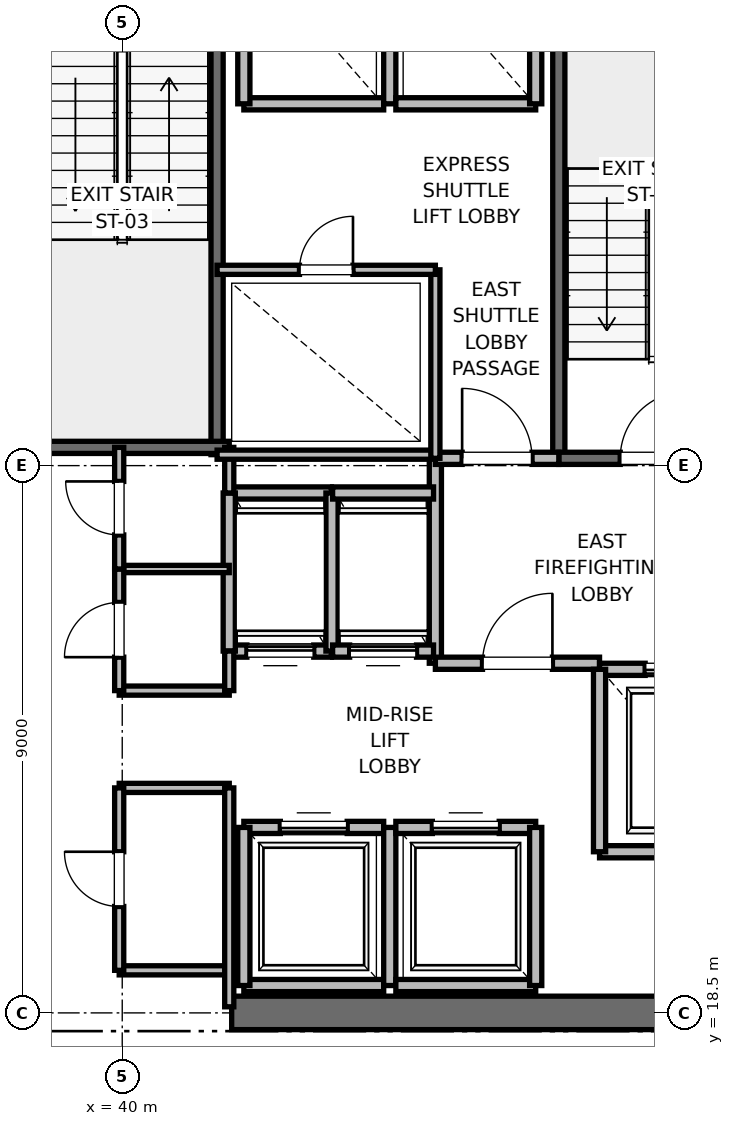
"""IFC4 building model, lengths in metres.
Left out: names, types, materials, properties, quantities, classifications, styles, units other than length and angle.
Written with IfcOpenShell. Run it as: python <this file> out.ifc"""

import sys

from ifc_helpers import new_model, si_unit, direction, frame, frame_2d, origin, place, context, subcontext, project, spatial, rectangle, extrude, element, fill, save


model = new_model("IFC4")
c1 = context("Model", 3, precision=1e-05, world=origin(), true_north=direction((0.0, 1.0)))
c2 = subcontext(c1, "Body", "Model", "MODEL_VIEW")
j1 = project(units=[si_unit("LENGTHUNIT", "METRE"), si_unit("PLANEANGLEUNIT", "RADIAN")], contexts=[c1])
p1 = place(None, origin())
s1 = spatial("IfcSite", under=j1, at=p1, CompositionType="ELEMENT")
p2 = place(p1, origin())
s2 = spatial("IfcBuilding", under=s1, at=p2, CompositionType="ELEMENT")
p3 = place(p2, frame((0.0, 0.0, 213.2)))
s3 = spatial("IfcBuildingStorey", under=s2, at=p3, CompositionType="ELEMENT", Elevation=213.2)
p4 = place(p3, frame((41.8, 18.5, 0.0), z_axis=(0.0, 0.0, 1.0), x_axis=(1.0, 0.0, 0.0)))
e1 = element("IfcWall", 1, at=p4, inside=s3, PredefinedType="SHEAR", context=c2, shape_type="SweptSolid", body=[
    extrude(rectangle(XDim=9.2, YDim=0.55, at=frame_2d((4.6, 0.0))), origin(), (0.0, 0.0, 1.0), 3.775),
])
p5 = place(p3, frame((47.18, 27.62, 0.0), z_axis=(0.0, 0.0, 1.0), x_axis=(0.0, 1.0, 0.0)))
e2 = element("IfcWall", 2, at=p5, inside=s3, PredefinedType="SOLIDWALL", context=c2, shape_type="SweptSolid", body=[
    extrude(rectangle(XDim=8.18, YDim=0.2, at=frame_2d((4.09, 0.0))), origin(), (0.0, 0.0, 1.0), 3.775),
])
p6 = place(p3, frame((47.18, 27.62, 0.0), z_axis=(0.0, 0.0, 1.0), x_axis=(1.0, 0.0, 0.0)))
e3 = element("IfcWall", 3, at=p6, inside=s3, PredefinedType="SOLIDWALL", context=c2, shape_type="SweptSolid", body=[
    extrude(rectangle(XDim=3.12, YDim=0.2, at=frame_2d((1.56, 0.0))), origin(), (0.0, 0.0, 1.0), 3.775),
])
p7 = place(p6, frame((1.01, 0.0, 0.0)))
e4 = element("IfcOpeningElement", 4, at=p7, cuts=e3, PredefinedType="OPENING", context=c2, shape_type="SweptSolid", body=[
    extrude(rectangle(XDim=1.1, YDim=2.15, at=frame_2d((0.55, 1.075))), frame((0.0, 0.1, 0.0), z_axis=(0.0, -1.0, 0.0), x_axis=(1.0, 0.0, 0.0)), (0.0, 0.0, 1.0), 0.2),
])
p8 = place(p3, frame((41.56, 27.68, 0.0), z_axis=(0.0, 0.0, 1.0), x_axis=(0.0, 1.0, 0.0)))
e5 = element("IfcWall", 5, at=p8, inside=s3, PredefinedType="SOLIDWALL", context=c2, shape_type="SweptSolid", body=[
    extrude(rectangle(XDim=8.57, YDim=0.2, at=frame_2d((4.285, 0.0))), origin(), (0.0, 0.0, 1.0), 3.775),
])
p9 = place(p3, frame((38.44, 27.8, 0.0), z_axis=(0.0, 0.0, 1.0), x_axis=(1.0, 0.0, 0.0)))
e6 = element("IfcWall", 6, at=p9, inside=s3, PredefinedType="SOLIDWALL", context=c2, shape_type="SweptSolid", body=[
    extrude(rectangle(XDim=3.32, YDim=0.2, at=frame_2d((1.66, 0.0))), origin(), (0.0, 0.0, 1.0), 3.775),
])
p10 = place(p3, frame((45.15, 24.25, 0.0), z_axis=(0.0, 0.0, 1.0), x_axis=(0.0, 1.0, 0.0)))
e7 = element("IfcWall", 7, at=p10, inside=s3, PredefinedType="PARTITIONING", context=c2, shape_type="SweptSolid", body=[
    extrude(rectangle(XDim=3.37, YDim=0.2, at=frame_2d((1.685, 0.0))), origin(), (0.0, 0.0, 1.0), 3.775),
])
p11 = place(p3, frame((45.15, 24.25, 0.0), z_axis=(0.0, 0.0, 1.0), x_axis=(1.0, 0.0, 0.0)))
e8 = element("IfcWall", 8, at=p11, inside=s3, PredefinedType="PARTITIONING", context=c2, shape_type="SweptSolid", body=[
    extrude(rectangle(XDim=2.7, YDim=0.2, at=frame_2d((1.35, 0.0))), origin(), (0.0, 0.0, 1.0), 3.775),
])
p12 = place(p11, frame((0.775, 0.0, 0.0)))
e9 = element("IfcOpeningElement", 9, at=p12, cuts=e8, PredefinedType="OPENING", context=c2, shape_type="SweptSolid", body=[
    extrude(rectangle(XDim=1.15, YDim=2.2, at=frame_2d((0.575, 1.1))), frame((0.0, 0.1, 0.0), z_axis=(0.0, -1.0, 0.0), x_axis=(1.0, 0.0, 0.0)), (0.0, 0.0, 1.0), 0.2),
])
p13 = place(p3, frame((45.15, 27.62, 0.0), z_axis=(0.0, 0.0, 1.0), x_axis=(1.0, 0.0, 0.0)))
e10 = element("IfcWall", 10, at=p13, inside=s3, PredefinedType="PARTITIONING", context=c2, shape_type="SweptSolid", body=[
    extrude(rectangle(XDim=2.03, YDim=0.2, at=frame_2d((1.015, 0.0))), origin(), (0.0, 0.0, 1.0), 3.775),
])
p14 = place(p13, frame((0.44, 0.0, 0.0)))
e11 = element("IfcOpeningElement", 11, at=p14, cuts=e10, PredefinedType="OPENING", context=c2, shape_type="SweptSolid", body=[
    extrude(rectangle(XDim=1.15, YDim=2.2, at=frame_2d((0.575, 1.1))), frame((0.0, 0.1, 0.0), z_axis=(0.0, -1.0, 0.0), x_axis=(1.0, 0.0, 0.0)), (0.0, 0.0, 1.0), 0.2),
])
p15 = place(p3, frame((47.85, 21.15, 0.0), z_axis=(0.0, 0.0, 1.0), x_axis=(1.0, 0.0, 0.0)))
e12 = element("IfcWall", 12, at=p15, inside=s3, PredefinedType="SOLIDWALL", context=c2, shape_type="SweptSolid", body=[
    extrude(rectangle(XDim=2.6, YDim=0.2, at=frame_2d((1.3, 0.0))), origin(), (0.0, 0.0, 1.0), 3.775),
])
p16 = place(p3, frame((50.45, 24.15, 0.0), z_axis=(0.0, 0.0, 1.0), x_axis=(-1.0, 0.0, 0.0)))
e13 = element("IfcWall", 13, at=p16, inside=s3, PredefinedType="SOLIDWALL", context=c2, shape_type="SweptSolid", body=[
    extrude(rectangle(XDim=2.6, YDim=0.2, at=frame_2d((1.3, 0.0))), origin(), (0.0, 0.0, 1.0), 2.755),
])
p17 = place(p16, frame((0.75, 0.0, 0.0)))
e14 = element("IfcOpeningElement", 14, at=p17, cuts=e13, PredefinedType="OPENING", context=c2, shape_type="SweptSolid", body=[
    extrude(rectangle(XDim=1.1, YDim=2.2, at=frame_2d((0.55, 1.1))), frame((0.0, 0.1, 0.0), z_axis=(0.0, -1.0, 0.0), x_axis=(1.0, 0.0, 0.0)), (0.0, 0.0, 1.0), 0.2),
])
p18 = place(p3, frame((47.85, 24.15, 0.0), z_axis=(0.0, 0.0, 1.0), x_axis=(0.0, -1.0, 0.0)))
e15 = element("IfcWall", 15, at=p18, inside=s3, PredefinedType="SOLIDWALL", context=c2, shape_type="SweptSolid", body=[
    extrude(rectangle(XDim=3.0, YDim=0.2, at=frame_2d((1.5, 0.0))), origin(), (0.0, 0.0, 1.0), 3.775),
])
p19 = place(p3, frame((42.0, 18.95, 0.0), z_axis=(0.0, 0.0, 1.0), x_axis=(1.0, 0.0, 0.0)))
e16 = element("IfcWall", 16, at=p19, inside=s3, PredefinedType="SOLIDWALL", context=c2, shape_type="SweptSolid", body=[
    extrude(rectangle(XDim=2.3, YDim=0.2, at=frame_2d((1.15, 0.0))), origin(), (0.0, 0.0, 1.0), 2.755),
])
p20 = place(p3, frame((44.3, 21.55, 0.0), z_axis=(0.0, 0.0, 1.0), x_axis=(-1.0, 0.0, 0.0)))
e17 = element("IfcWall", 17, at=p20, inside=s3, PredefinedType="SOLIDWALL", context=c2, shape_type="SweptSolid", body=[
    extrude(rectangle(XDim=2.3, YDim=0.2, at=frame_2d((1.15, 0.0))), origin(), (0.0, 0.0, 1.0), 3.775),
])
p21 = place(p20, frame((0.6, 0.0, 0.0)))
e18 = element("IfcOpeningElement", 18, at=p21, cuts=e17, PredefinedType="OPENING", context=c2, shape_type="SweptSolid", body=[
    extrude(rectangle(XDim=1.1, YDim=2.2, at=frame_2d((0.55, 1.1))), frame((0.0, 0.1, 0.0), z_axis=(0.0, -1.0, 0.0), x_axis=(1.0, 0.0, 0.0)), (0.0, 0.0, 1.0), 0.2),
])
p22 = place(p3, frame((42.0, 21.55, 0.0), z_axis=(0.0, 0.0, 1.0), x_axis=(0.0, -1.0, 0.0)))
e19 = element("IfcWall", 19, at=p22, inside=s3, PredefinedType="SOLIDWALL", context=c2, shape_type="SweptSolid", body=[
    extrude(rectangle(XDim=2.6, YDim=0.2, at=frame_2d((1.3, 0.0))), origin(), (0.0, 0.0, 1.0), 2.755),
])
p23 = place(p3, frame((44.4, 18.95, 0.0), z_axis=(0.0, 0.0, 1.0), x_axis=(0.0, 1.0, 0.0)))
e20 = element("IfcWall", 20, at=p23, inside=s3, PredefinedType="SOLIDWALL", context=c2, shape_type="SweptSolid", body=[
    extrude(rectangle(XDim=2.6, YDim=0.2, at=frame_2d((1.3, 0.0))), origin(), (0.0, 0.0, 1.0), 3.775),
])
p24 = place(p3, frame((44.5, 18.95, 0.0), z_axis=(0.0, 0.0, 1.0), x_axis=(1.0, 0.0, 0.0)))
e21 = element("IfcWall", 21, at=p24, inside=s3, PredefinedType="SOLIDWALL", context=c2, shape_type="SweptSolid", body=[
    extrude(rectangle(XDim=2.3, YDim=0.2, at=frame_2d((1.15, 0.0))), origin(), (0.0, 0.0, 1.0), 3.775),
])
p25 = place(p3, frame((46.8, 21.55, 0.0), z_axis=(0.0, 0.0, 1.0), x_axis=(-1.0, 0.0, 0.0)))
e22 = element("IfcWall", 22, at=p25, inside=s3, PredefinedType="SOLIDWALL", context=c2, shape_type="SweptSolid", body=[
    extrude(rectangle(XDim=2.3, YDim=0.2, at=frame_2d((1.15, 0.0))), origin(), (0.0, 0.0, 1.0), 3.775),
])
p26 = place(p25, frame((0.6, 0.0, 0.0)))
e23 = element("IfcOpeningElement", 23, at=p26, cuts=e22, PredefinedType="OPENING", context=c2, shape_type="SweptSolid", body=[
    extrude(rectangle(XDim=1.1, YDim=2.2, at=frame_2d((0.55, 1.1))), frame((0.0, 0.1, 0.0), z_axis=(0.0, -1.0, 0.0), x_axis=(1.0, 0.0, 0.0)), (0.0, 0.0, 1.0), 0.2),
])
p27 = place(p3, frame((46.8, 18.95, 0.0), z_axis=(0.0, 0.0, 1.0), x_axis=(0.0, 1.0, 0.0)))
e24 = element("IfcWall", 24, at=p27, inside=s3, PredefinedType="SOLIDWALL", context=c2, shape_type="SweptSolid", body=[
    extrude(rectangle(XDim=2.6, YDim=0.2, at=frame_2d((1.3, 0.0))), origin(), (0.0, 0.0, 1.0), 3.775),
])
p28 = place(p3, frame((41.76, 24.45, 0.0), z_axis=(0.0, 0.0, 1.0), x_axis=(1.0, 0.0, 0.0)))
e25 = element("IfcWall", 25, at=p28, inside=s3, PredefinedType="SOLIDWALL", context=c2, shape_type="SweptSolid", body=[
    extrude(rectangle(XDim=1.68, YDim=0.2, at=frame_2d((0.84, 0.0))), origin(), (0.0, 0.0, 1.0), 3.775),
])
p29 = place(p28, frame((0.29, 0.0, 0.0)))
e26 = element("IfcOpeningElement", 26, at=p29, cuts=e25, PredefinedType="OPENING", context=c2, shape_type="SweptSolid", body=[
    extrude(rectangle(XDim=1.1, YDim=2.2, at=frame_2d((0.55, 1.1))), frame((0.0, 0.1, 0.0), z_axis=(0.0, -1.0, 0.0), x_axis=(1.0, 0.0, 0.0)), (0.0, 0.0, 1.0), 0.2),
])
p30 = place(p3, frame((43.44, 27.05, 0.0), z_axis=(0.0, 0.0, 1.0), x_axis=(-1.0, 0.0, 0.0)))
e27 = element("IfcWall", 27, at=p30, inside=s3, PredefinedType="SOLIDWALL", context=c2, shape_type="SweptSolid", body=[
    extrude(rectangle(XDim=1.68, YDim=0.2, at=frame_2d((0.84, 0.0))), origin(), (0.0, 0.0, 1.0), 3.775),
])
for number, where, z_axis, x_axis in (
    (28, (41.76, 27.05, 0.0), (0.0, 0.0, 1.0), (0.0, -1.0, 0.0)),
    (29, (43.45, 24.45, 0.0), (0.0, 0.0, 1.0), (0.0, 1.0, 0.0)),
):
    element("IfcWall", number, at=place(p3, frame(where, z_axis=z_axis, x_axis=x_axis)), inside=s3, PredefinedType="SOLIDWALL", context=c2, shape_type="SweptSolid", body=[
        extrude(rectangle(XDim=2.6, YDim=0.2, at=frame_2d((1.3, 0.0))), origin(), (0.0, 0.0, 1.0), 3.775),
    ])
p31 = place(p3, frame((43.46, 24.45, 0.0), z_axis=(0.0, 0.0, 1.0), x_axis=(1.0, 0.0, 0.0)))
e30 = element("IfcWall", 30, at=p31, inside=s3, PredefinedType="SOLIDWALL", context=c2, shape_type="SweptSolid", body=[
    extrude(rectangle(XDim=1.66, YDim=0.2, at=frame_2d((0.83, 0.0))), origin(), (0.0, 0.0, 1.0), 3.775),
])
p32 = place(p31, frame((0.28, 0.0, 0.0)))
e31 = element("IfcOpeningElement", 31, at=p32, cuts=e30, PredefinedType="OPENING", context=c2, shape_type="SweptSolid", body=[
    extrude(rectangle(XDim=1.1, YDim=2.2, at=frame_2d((0.55, 1.1))), frame((0.0, 0.1, 0.0), z_axis=(0.0, -1.0, 0.0), x_axis=(1.0, 0.0, 0.0)), (0.0, 0.0, 1.0), 0.2),
])
p33 = place(p3, frame((45.12, 27.05, 0.0), z_axis=(0.0, 0.0, 1.0), x_axis=(-1.0, 0.0, 0.0)))
e32 = element("IfcWall", 32, at=p33, inside=s3, PredefinedType="SOLIDWALL", context=c2, shape_type="SweptSolid", body=[
    extrude(rectangle(XDim=1.66, YDim=0.2, at=frame_2d((0.83, 0.0))), origin(), (0.0, 0.0, 1.0), 3.775),
])
p34 = place(p3, frame((42.0, 33.45, 0.0), z_axis=(0.0, 0.0, 1.0), x_axis=(1.0, 0.0, 0.0)))
e33 = element("IfcWall", 33, at=p34, inside=s3, PredefinedType="SOLIDWALL", context=c2, shape_type="SweptSolid", body=[
    extrude(rectangle(XDim=2.3, YDim=0.2, at=frame_2d((1.15, 0.0))), origin(), (0.0, 0.0, 1.0), 3.775),
])
for number, where, z_axis, x_axis in (
    (34, (42.0, 36.05, 0.0), (0.0, 0.0, 1.0), (0.0, -1.0, 0.0)),
    (35, (44.4, 33.45, 0.0), (0.0, 0.0, 1.0), (0.0, 1.0, 0.0)),
):
    element("IfcWall", number, at=place(p3, frame(where, z_axis=z_axis, x_axis=x_axis)), inside=s3, PredefinedType="SOLIDWALL", context=c2, shape_type="SweptSolid", body=[
        extrude(rectangle(XDim=2.6, YDim=0.2, at=frame_2d((1.3, 0.0))), origin(), (0.0, 0.0, 1.0), 2.755),
    ])
p35 = place(p3, frame((44.5, 33.45, 0.0), z_axis=(0.0, 0.0, 1.0), x_axis=(1.0, 0.0, 0.0)))
e36 = element("IfcWall", 36, at=p35, inside=s3, PredefinedType="SOLIDWALL", context=c2, shape_type="SweptSolid", body=[
    extrude(rectangle(XDim=2.3, YDim=0.2, at=frame_2d((1.15, 0.0))), origin(), (0.0, 0.0, 1.0), 3.775),
])
p36 = place(p3, frame((46.8, 33.45, 0.0), z_axis=(0.0, 0.0, 1.0), x_axis=(0.0, 1.0, 0.0)))
e37 = element("IfcWall", 37, at=p36, inside=s3, PredefinedType="SOLIDWALL", context=c2, shape_type="SweptSolid", body=[
    extrude(rectangle(XDim=2.6, YDim=0.2, at=frame_2d((1.3, 0.0))), origin(), (0.0, 0.0, 1.0), 3.775),
])
for number, where, z_axis, x_axis in (
    (38, (39.95, 19.2, 0.0), (0.0, 0.0, 1.0), (1.0, 0.0, 0.0)),
    (39, (39.95, 22.2, 0.0), (0.0, 0.0, 1.0), (1.0, 0.0, 0.0)),
    (40, (39.95, 23.8, 0.0), (0.0, 0.0, 1.0), (1.0, 0.0, 0.0)),
):
    element("IfcWall", number, at=place(p3, frame(where, z_axis=z_axis, x_axis=x_axis)), inside=s3, PredefinedType="PARTITIONING", context=c2, shape_type="SweptSolid", body=[
        extrude(rectangle(XDim=1.81, YDim=0.15, at=frame_2d((0.905, 0.0))), origin(), (0.0, 0.0, 1.0), 2.85),
    ])
p37 = place(p3, frame((39.95, 25.8, 0.0), z_axis=(0.0, 0.0, 1.0), x_axis=(1.0, 0.0, 0.0)))
e41 = element("IfcWall", 41, at=p37, inside=s3, PredefinedType="PARTITIONING", context=c2, shape_type="SweptSolid", body=[
    extrude(rectangle(XDim=1.81, YDim=0.12, at=frame_2d((0.905, 0.0))), origin(), (0.0, 0.0, 1.0), 2.85),
])
p38 = place(p3, frame((41.76, 18.6, 0.0), z_axis=(0.0, 0.0, 1.0), x_axis=(0.0, 1.0, 0.0)))
e42 = element("IfcWall", 42, at=p38, inside=s3, PredefinedType="PARTITIONING", context=c2, shape_type="SweptSolid", body=[
    extrude(rectangle(XDim=3.6, YDim=0.15, at=frame_2d((1.8, 0.0))), origin(), (0.0, 0.0, 1.0), 2.755),
])
p39 = place(p3, frame((41.76, 23.8, 0.0), z_axis=(0.0, 0.0, 1.0), x_axis=(0.0, 1.0, 0.0)))
e43 = element("IfcWall", 43, at=p39, inside=s3, PredefinedType="PARTITIONING", context=c2, shape_type="SweptSolid", body=[
    extrude(rectangle(XDim=0.65, YDim=0.15, at=frame_2d((0.325, 0.0))), origin(), (0.0, 0.0, 1.0), 2.85),
])
p40 = place(p3, frame((41.76, 27.05, 0.0), z_axis=(0.0, 0.0, 1.0), x_axis=(0.0, 1.0, 0.0)))
e44 = element("IfcWall", 44, at=p40, inside=s3, PredefinedType="PARTITIONING", context=c2, shape_type="SweptSolid", body=[
    extrude(rectangle(XDim=0.75, YDim=0.15, at=frame_2d((0.375, 0.0))), origin(), (0.0, 0.0, 1.0), 2.85),
])
p41 = place(p3, frame((39.95, 19.2, 0.0), z_axis=(0.0, 0.0, 1.0), x_axis=(0.0, 1.0, 0.0)))
e45 = element("IfcWall", 45, at=p41, inside=s3, PredefinedType="PARTITIONING", context=c2, shape_type="SweptSolid", body=[
    extrude(rectangle(XDim=3.0, YDim=0.15, at=frame_2d((1.5, 0.0))), origin(), (0.0, 0.0, 1.0), 2.85),
])
p42 = place(p41, frame((1.05, 0.0, 0.0)))
e46 = element("IfcOpeningElement", 46, at=p42, cuts=e45, PredefinedType="OPENING", context=c2, shape_type="SweptSolid", body=[
    extrude(rectangle(XDim=0.9, YDim=2.1, at=frame_2d((0.45, 1.05))), frame((0.0, 0.075, 0.0), z_axis=(0.0, -1.0, 0.0), x_axis=(1.0, 0.0, 0.0)), (0.0, 0.0, 1.0), 0.15),
])
p43 = place(p3, frame((39.95, 23.8, 0.0), z_axis=(0.0, 0.0, 1.0), x_axis=(0.0, 1.0, 0.0)))
e47 = element("IfcWall", 47, at=p43, inside=s3, PredefinedType="PARTITIONING", context=c2, shape_type="SweptSolid", body=[
    extrude(rectangle(XDim=2.0, YDim=0.15, at=frame_2d((1.0, 0.0))), origin(), (0.0, 0.0, 1.0), 2.85),
])
p44 = place(p43, frame((0.55, 0.0, 0.0)))
e48 = element("IfcOpeningElement", 48, at=p44, cuts=e47, PredefinedType="OPENING", context=c2, shape_type="SweptSolid", body=[
    extrude(rectangle(XDim=0.9, YDim=2.1, at=frame_2d((0.45, 1.05))), frame((0.0, 0.075, 0.0), z_axis=(0.0, -1.0, 0.0), x_axis=(1.0, 0.0, 0.0)), (0.0, 0.0, 1.0), 0.15),
])
p45 = place(p3, frame((39.95, 25.8, 0.0), z_axis=(0.0, 0.0, 1.0), x_axis=(0.0, 1.0, 0.0)))
e49 = element("IfcWall", 49, at=p45, inside=s3, PredefinedType="PARTITIONING", context=c2, shape_type="SweptSolid", body=[
    extrude(rectangle(XDim=2.0, YDim=0.15, at=frame_2d((1.0, 0.0))), origin(), (0.0, 0.0, 1.0), 2.85),
])
p46 = place(p45, frame((0.56, 0.0, 0.0)))
e50 = element("IfcOpeningElement", 50, at=p46, cuts=e49, PredefinedType="OPENING", context=c2, shape_type="SweptSolid", body=[
    extrude(rectangle(XDim=0.88, YDim=2.1, at=frame_2d((0.44, 1.05))), frame((0.0, 0.075, 0.0), z_axis=(0.0, -1.0, 0.0), x_axis=(1.0, 0.0, 0.0)), (0.0, 0.0, 1.0), 0.15),
])
p47 = place(p3, frame((41.56, 27.68, 0.0), z_axis=(0.0, 0.0, 1.0), x_axis=(1.0, 0.0, 0.0)))
e51 = element("IfcWall", 51, at=p47, inside=s3, PredefinedType="PARTITIONING", context=c2, shape_type="SweptSolid", body=[
    extrude(rectangle(XDim=3.59, YDim=0.15, at=frame_2d((1.795, 0.0))), origin(), (0.0, 0.0, 1.0), 2.85),
])
p48 = place(p3, frame((45.15, 27.62, 0.0), z_axis=(0.0, 0.0, 1.0), x_axis=(0.0, 1.0, 0.0)))
e52 = element("IfcWall", 52, at=p48, inside=s3, PredefinedType="PARTITIONING", context=c2, shape_type="SweptSolid", body=[
    extrude(rectangle(XDim=3.1, YDim=0.15, at=frame_2d((1.55, 0.0))), origin(), (0.0, 0.0, 1.0), 2.85),
])
p49 = place(p3, frame((41.56, 30.72, 0.0), z_axis=(0.0, 0.0, 1.0), x_axis=(1.0, 0.0, 0.0)))
e53 = element("IfcWall", 53, at=p49, inside=s3, PredefinedType="PARTITIONING", context=c2, shape_type="SweptSolid", body=[
    extrude(rectangle(XDim=3.59, YDim=0.15, at=frame_2d((1.795, 0.0))), origin(), (0.0, 0.0, 1.0), 2.85),
])
p50 = place(p49, frame((1.355, 0.0, 0.0)))
e54 = element("IfcOpeningElement", 54, at=p50, cuts=e53, PredefinedType="OPENING", context=c2, shape_type="SweptSolid", body=[
    extrude(rectangle(XDim=0.88, YDim=2.1, at=frame_2d((0.44, 1.05))), frame((0.0, 0.075, 0.0), z_axis=(0.0, -1.0, 0.0), x_axis=(1.0, 0.0, 0.0)), (0.0, 0.0, 1.0), 0.15),
])
p51 = place(p7, origin())
e55 = element("IfcDoor", 55, at=p51, inside=s3, OperationType="SINGLE_SWING_RIGHT", PredefinedType="DOOR", context=c2, shape_type="SweptSolid", body=[
    extrude(rectangle(XDim=1.1, YDim=2.15, at=frame_2d((0.55, 1.075))), frame((0.0, 0.025, 0.0), z_axis=(0.0, -1.0, 0.0), x_axis=(1.0, 0.0, 0.0)), (0.0, 0.0, 1.0), 0.05),
])
fill(e4, e55)
p52 = place(p12, origin())
e56 = element("IfcDoor", 56, at=p52, inside=s3, OperationType="SINGLE_SWING_RIGHT", PredefinedType="DOOR", context=c2, shape_type="SweptSolid", body=[
    extrude(rectangle(XDim=1.15, YDim=2.2, at=frame_2d((0.575, 1.1))), frame((0.0, 0.025, 0.0), z_axis=(0.0, -1.0, 0.0), x_axis=(1.0, 0.0, 0.0)), (0.0, 0.0, 1.0), 0.05),
])
fill(e9, e56)
p53 = place(p14, origin())
e57 = element("IfcDoor", 57, at=p53, inside=s3, OperationType="SINGLE_SWING_LEFT", PredefinedType="DOOR", context=c2, shape_type="SweptSolid", body=[
    extrude(rectangle(XDim=1.15, YDim=2.2, at=frame_2d((0.575, 1.1))), frame((0.0, 0.025, 0.0), z_axis=(0.0, -1.0, 0.0), x_axis=(1.0, 0.0, 0.0)), (0.0, 0.0, 1.0), 0.05),
])
fill(e11, e57)
p54 = place(p17, origin())
e58 = element("IfcDoor", 58, at=p54, inside=s3, OperationType="SLIDING_TO_RIGHT", PredefinedType="DOOR", context=c2, shape_type="SweptSolid", body=[
    extrude(rectangle(XDim=1.1, YDim=2.2, at=frame_2d((0.55, 1.1))), frame((0.0, 0.025, 0.0), z_axis=(0.0, -1.0, 0.0), x_axis=(1.0, 0.0, 0.0)), (0.0, 0.0, 1.0), 0.05),
])
fill(e14, e58)
p55 = place(p21, origin())
e59 = element("IfcDoor", 59, at=p55, inside=s3, OperationType="SLIDING_TO_RIGHT", PredefinedType="DOOR", context=c2, shape_type="SweptSolid", body=[
    extrude(rectangle(XDim=1.1, YDim=2.2, at=frame_2d((0.55, 1.1))), frame((0.0, 0.025, 0.0), z_axis=(0.0, -1.0, 0.0), x_axis=(1.0, 0.0, 0.0)), (0.0, 0.0, 1.0), 0.05),
])
fill(e18, e59)
p56 = place(p26, origin())
e60 = element("IfcDoor", 60, at=p56, inside=s3, OperationType="SLIDING_TO_RIGHT", PredefinedType="DOOR", context=c2, shape_type="SweptSolid", body=[
    extrude(rectangle(XDim=1.1, YDim=2.2, at=frame_2d((0.55, 1.1))), frame((0.0, 0.025, 0.0), z_axis=(0.0, -1.0, 0.0), x_axis=(1.0, 0.0, 0.0)), (0.0, 0.0, 1.0), 0.05),
])
fill(e23, e60)
p57 = place(p29, origin())
e61 = element("IfcDoor", 61, at=p57, inside=s3, OperationType="SLIDING_TO_RIGHT", PredefinedType="DOOR", context=c2, shape_type="SweptSolid", body=[
    extrude(rectangle(XDim=1.1, YDim=2.2, at=frame_2d((0.55, 1.1))), frame((0.0, 0.025, 0.0), z_axis=(0.0, -1.0, 0.0), x_axis=(1.0, 0.0, 0.0)), (0.0, 0.0, 1.0), 0.05),
])
fill(e26, e61)
p58 = place(p32, origin())
e62 = element("IfcDoor", 62, at=p58, inside=s3, OperationType="SLIDING_TO_RIGHT", PredefinedType="DOOR", context=c2, shape_type="SweptSolid", body=[
    extrude(rectangle(XDim=1.1, YDim=2.2, at=frame_2d((0.55, 1.1))), frame((0.0, 0.025, 0.0), z_axis=(0.0, -1.0, 0.0), x_axis=(1.0, 0.0, 0.0)), (0.0, 0.0, 1.0), 0.05),
])
fill(e31, e62)
p59 = place(p42, origin())
e63 = element("IfcDoor", 63, at=p59, inside=s3, OperationType="SINGLE_SWING_RIGHT", PredefinedType="DOOR", context=c2, shape_type="SweptSolid", body=[
    extrude(rectangle(XDim=0.9, YDim=2.1, at=frame_2d((0.45, 1.05))), frame((0.0, 0.025, 0.0), z_axis=(0.0, -1.0, 0.0), x_axis=(1.0, 0.0, 0.0)), (0.0, 0.0, 1.0), 0.05),
])
fill(e46, e63)
p60 = place(p44, origin())
e64 = element("IfcDoor", 64, at=p60, inside=s3, OperationType="SINGLE_SWING_LEFT", PredefinedType="DOOR", context=c2, shape_type="SweptSolid", body=[
    extrude(rectangle(XDim=0.9, YDim=2.1, at=frame_2d((0.45, 1.05))), frame((0.0, 0.025, 0.0), z_axis=(0.0, -1.0, 0.0), x_axis=(1.0, 0.0, 0.0)), (0.0, 0.0, 1.0), 0.05),
])
fill(e48, e64)
p61 = place(p46, origin())
e65 = element("IfcDoor", 65, at=p61, inside=s3, OperationType="SINGLE_SWING_RIGHT", PredefinedType="DOOR", context=c2, shape_type="SweptSolid", body=[
    extrude(rectangle(XDim=0.88, YDim=2.1, at=frame_2d((0.44, 1.05))), frame((0.0, 0.025, 0.0), z_axis=(0.0, -1.0, 0.0), x_axis=(1.0, 0.0, 0.0)), (0.0, 0.0, 1.0), 0.05),
])
fill(e50, e65)
p62 = place(p50, origin())
e66 = element("IfcDoor", 66, at=p62, inside=s3, OperationType="SINGLE_SWING_RIGHT", PredefinedType="DOOR", context=c2, shape_type="SweptSolid", body=[
    extrude(rectangle(XDim=0.88, YDim=2.1, at=frame_2d((0.44, 1.05))), frame((0.0, 0.025, 0.0), z_axis=(0.0, -1.0, 0.0), x_axis=(1.0, 0.0, 0.0)), (0.0, 0.0, 1.0), 0.05),
])
fill(e54, e66)
save(model, sys.argv[1])
